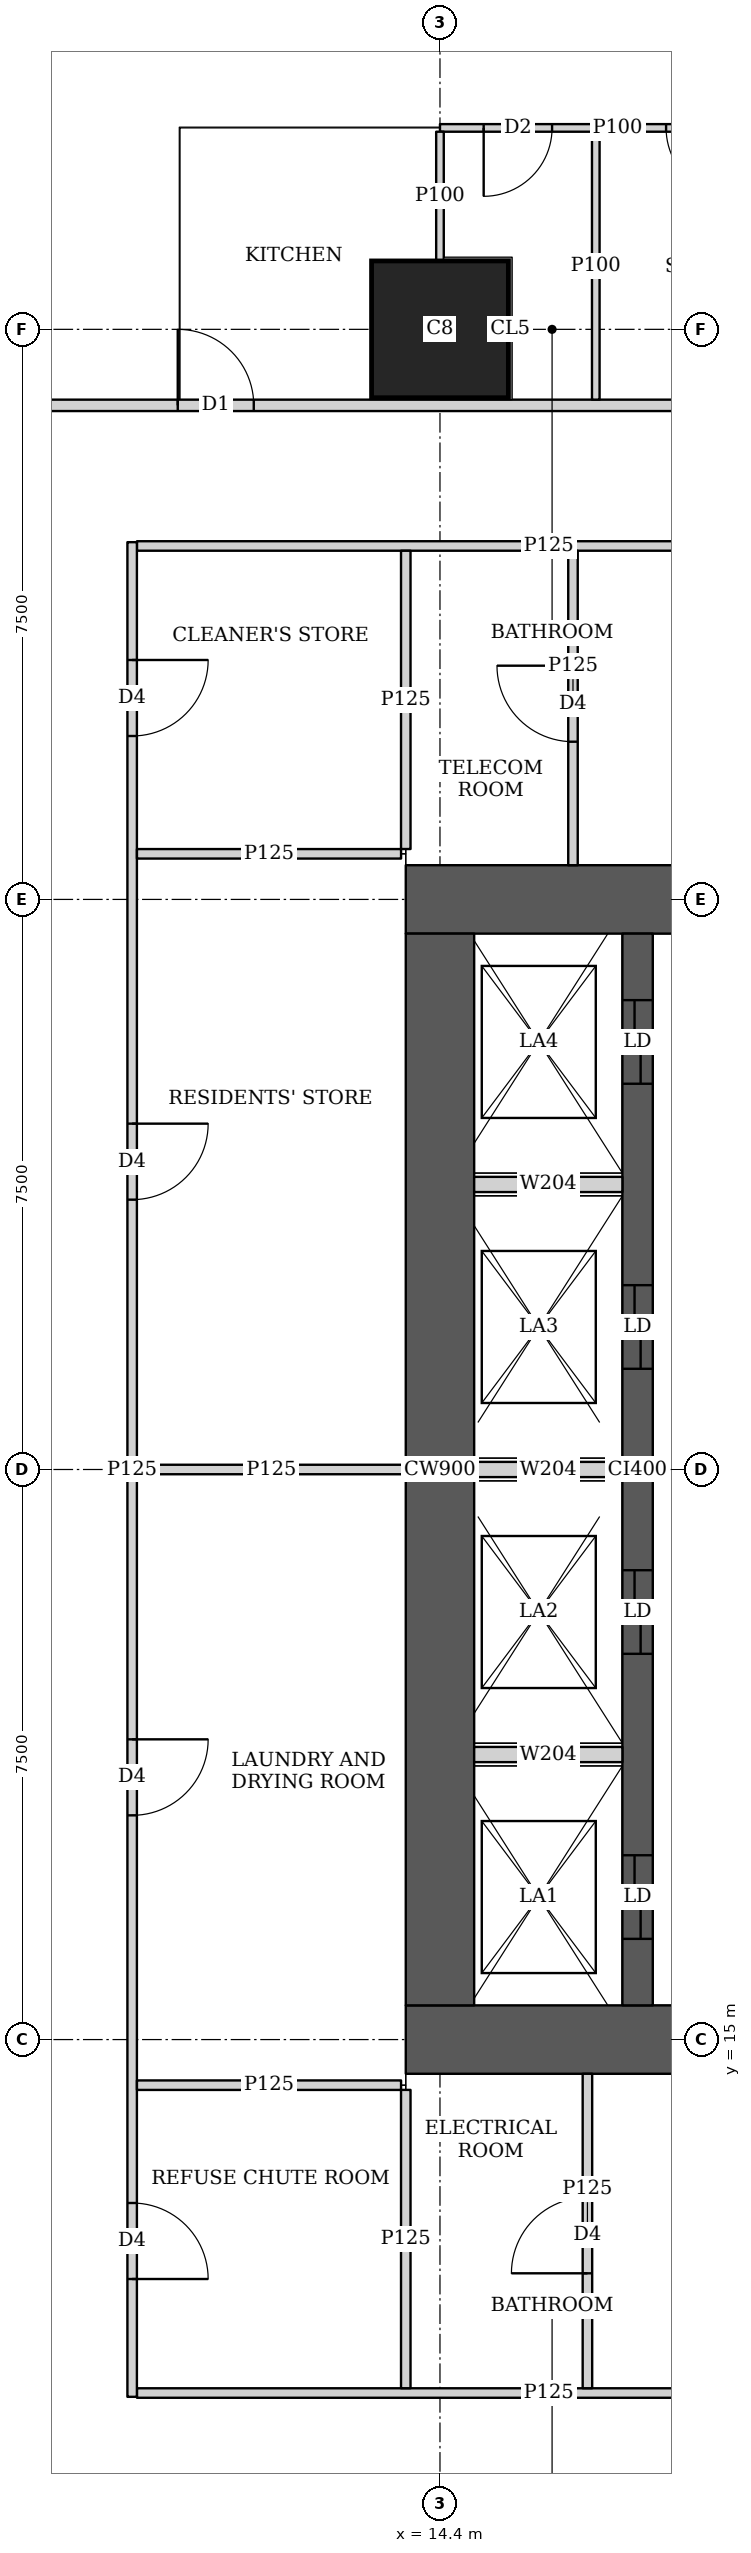
"""IFC4 building model, lengths in metres.
Left out: names, types, materials, properties, quantities, classifications, styles, units other than length and angle.
Written with IfcOpenShell. Run it as: python <this file> out.ifc"""

import sys

from ifc_helpers import new_model, si_unit, direction, frame, frame_2d, origin, origin_2d, place, context, subcontext, project, spatial, rectangle, extrude, element, fill, save


model = new_model("IFC4")
c1 = context("Model", 3, precision=1e-05, world=origin(), true_north=direction((0.0, 1.0)))
c2 = subcontext(c1, "Body", "Model", "MODEL_VIEW")
j1 = project(units=[si_unit("LENGTHUNIT", "METRE"), si_unit("PLANEANGLEUNIT", "RADIAN")], contexts=[c1])
p1 = place(None, origin())
s1 = spatial("IfcSite", under=j1, at=p1, CompositionType="ELEMENT")
p2 = place(p1, origin())
s2 = spatial("IfcBuilding", under=s1, at=p2, CompositionType="ELEMENT")
p3 = place(p2, frame((0.0, 0.0, 68.75)))
s3 = spatial("IfcBuildingStorey", under=s2, at=p3, CompositionType="ELEMENT", Elevation=68.75)
p4 = place(p3, frame((14.4, 37.5, 0.0), z_axis=(0.0, 0.0, 1.0), x_axis=(1.0, 0.0, 0.0)))
e1 = element("IfcColumn", 1, at=p4, inside=s3, PredefinedType="COLUMN", context=c2, shape_type="SweptSolid", body=[
    extrude(rectangle(XDim=1.8, YDim=1.8, at=origin_2d()), origin(), (0.0, 0.0, 1.0), 3.75),
])
p5 = place(p3, frame((13.95, 15.0, 0.0), z_axis=(0.0, 0.0, 1.0), x_axis=(1.0, 0.0, 0.0)))
e2 = element("IfcWall", 2, at=p5, inside=s3, PredefinedType="SHEAR", context=c2, shape_type="SweptSolid", body=[
    extrude(rectangle(XDim=15.3, YDim=0.9, at=frame_2d((7.65, 0.0))), origin(), (0.0, 0.0, 1.0), 3.75),
])
p6 = place(p5, frame((4.45, 0.0, 0.0)))
e3 = element("IfcOpeningElement", 3, at=p6, cuts=e2, PredefinedType="OPENING", context=c2, shape_type="SweptSolid", body=[
    extrude(rectangle(XDim=1.8, YDim=2.1, at=frame_2d((0.9, 1.05))), frame((0.0, 0.46, 0.0), z_axis=(0.0, -1.0, 0.0), x_axis=(1.0, 0.0, 0.0)), (0.0, 0.0, 1.0), 0.92),
])
p7 = place(p5, frame((10.7, 0.0, 0.0)))
e4 = element("IfcOpeningElement", 4, at=p7, cuts=e2, PredefinedType="OPENING", context=c2, shape_type="SweptSolid", body=[
    extrude(rectangle(XDim=1.1, YDim=2.1, at=frame_2d((0.55, 1.05))), frame((0.0, 0.46, 0.0), z_axis=(0.0, -1.0, 0.0), x_axis=(1.0, 0.0, 0.0)), (0.0, 0.0, 1.0), 0.92),
])
p8 = place(p3, frame((13.95, 30.0, 0.0), z_axis=(0.0, 0.0, 1.0), x_axis=(1.0, 0.0, 0.0)))
e5 = element("IfcWall", 5, at=p8, inside=s3, PredefinedType="SHEAR", context=c2, shape_type="SweptSolid", body=[
    extrude(rectangle(XDim=15.3, YDim=0.9, at=frame_2d((7.65, 0.0))), origin(), (0.0, 0.0, 1.0), 3.75),
])
p9 = place(p8, frame((4.45, 0.0, 0.0)))
e6 = element("IfcOpeningElement", 6, at=p9, cuts=e5, PredefinedType="OPENING", context=c2, shape_type="SweptSolid", body=[
    extrude(rectangle(XDim=1.8, YDim=2.1, at=frame_2d((0.9, 1.05))), frame((0.0, 0.46, 0.0), z_axis=(0.0, -1.0, 0.0), x_axis=(1.0, 0.0, 0.0)), (0.0, 0.0, 1.0), 0.92),
])
p10 = place(p8, frame((10.7, 0.0, 0.0)))
e7 = element("IfcOpeningElement", 7, at=p10, cuts=e5, PredefinedType="OPENING", context=c2, shape_type="SweptSolid", body=[
    extrude(rectangle(XDim=1.1, YDim=2.1, at=frame_2d((0.55, 1.05))), frame((0.0, 0.46, 0.0), z_axis=(0.0, -1.0, 0.0), x_axis=(1.0, 0.0, 0.0)), (0.0, 0.0, 1.0), 0.92),
])
p11 = place(p3, frame((14.4, 15.45, 0.0), z_axis=(0.0, 0.0, 1.0), x_axis=(0.0, 1.0, 0.0)))
e8 = element("IfcWall", 8, at=p11, inside=s3, PredefinedType="SHEAR", context=c2, shape_type="SweptSolid", body=[
    extrude(rectangle(XDim=14.1, YDim=0.9, at=frame_2d((7.05, 0.0))), origin(), (0.0, 0.0, 1.0), 3.75),
])
p12 = place(p3, frame((17.0, 15.45, 0.0), z_axis=(0.0, 0.0, 1.0), x_axis=(0.0, 1.0, 0.0)))
e9 = element("IfcWall", 9, at=p12, inside=s3, PredefinedType="SHEAR", context=c2, shape_type="SweptSolid", body=[
    extrude(rectangle(XDim=14.1, YDim=0.4, at=frame_2d((7.05, 0.0))), origin(), (0.0, 0.0, 1.0), 3.75),
])
p13 = place(p12, frame((0.875, 0.0, 0.0)))
e10 = element("IfcOpeningElement", 10, at=p13, cuts=e9, PredefinedType="OPENING", context=c2, shape_type="SweptSolid", body=[
    extrude(rectangle(XDim=1.1, YDim=2.1, at=frame_2d((0.55, 1.05))), frame((0.0, 0.21, 0.0), z_axis=(0.0, -1.0, 0.0), x_axis=(1.0, 0.0, 0.0)), (0.0, 0.0, 1.0), 0.42),
])
p14 = place(p12, frame((4.625, 0.0, 0.0)))
e11 = element("IfcOpeningElement", 11, at=p14, cuts=e9, PredefinedType="OPENING", context=c2, shape_type="SweptSolid", body=[
    extrude(rectangle(XDim=1.1, YDim=2.1, at=frame_2d((0.55, 1.05))), frame((0.0, 0.21, 0.0), z_axis=(0.0, -1.0, 0.0), x_axis=(1.0, 0.0, 0.0)), (0.0, 0.0, 1.0), 0.42),
])
p15 = place(p12, frame((8.375, 0.0, 0.0)))
e12 = element("IfcOpeningElement", 12, at=p15, cuts=e9, PredefinedType="OPENING", context=c2, shape_type="SweptSolid", body=[
    extrude(rectangle(XDim=1.1, YDim=2.1, at=frame_2d((0.55, 1.05))), frame((0.0, 0.21, 0.0), z_axis=(0.0, -1.0, 0.0), x_axis=(1.0, 0.0, 0.0)), (0.0, 0.0, 1.0), 0.42),
])
p16 = place(p12, frame((12.125, 0.0, 0.0)))
e13 = element("IfcOpeningElement", 13, at=p16, cuts=e9, PredefinedType="OPENING", context=c2, shape_type="SweptSolid", body=[
    extrude(rectangle(XDim=1.1, YDim=2.1, at=frame_2d((0.55, 1.05))), frame((0.0, 0.21, 0.0), z_axis=(0.0, -1.0, 0.0), x_axis=(1.0, 0.0, 0.0)), (0.0, 0.0, 1.0), 0.42),
])
p17 = place(p3, frame((8.35, 36.5, 0.0), z_axis=(0.0, 0.0, 1.0), x_axis=(1.0, 0.0, 0.0)))
e14 = element("IfcWall", 14, at=p17, inside=s3, PredefinedType="SOLIDWALL", context=c2, shape_type="SweptSolid", body=[
    extrude(rectangle(XDim=26.415, YDim=0.15, at=frame_2d((13.208, 0.0))), origin(), (0.0, 0.0, 1.0), 3.45),
])
p18 = place(p17, frame((2.6, 0.0, 0.0)))
e15 = element("IfcOpeningElement", 15, at=p18, cuts=e14, PredefinedType="OPENING", context=c2, shape_type="SweptSolid", body=[
    extrude(rectangle(XDim=1.0, YDim=2.1, at=frame_2d((0.5, 1.05))), frame((0.0, 0.085, 0.0), z_axis=(0.0, -1.0, 0.0), x_axis=(1.0, 0.0, 0.0)), (0.0, 0.0, 1.0), 0.17),
])
p19 = place(p17, frame((10.949, 0.0, 0.0)))
e16 = element("IfcOpeningElement", 16, at=p19, cuts=e14, PredefinedType="OPENING", context=c2, shape_type="SweptSolid", body=[
    extrude(rectangle(XDim=1.0, YDim=2.1, at=frame_2d((0.5, 1.05))), frame((0.0, 0.085, 0.0), z_axis=(0.0, -1.0, 0.0), x_axis=(1.0, 0.0, 0.0)), (0.0, 0.0, 1.0), 0.17),
])
p20 = place(p17, frame((18.149, 0.0, 0.0)))
e17 = element("IfcOpeningElement", 17, at=p20, cuts=e14, PredefinedType="OPENING", context=c2, shape_type="SweptSolid", body=[
    extrude(rectangle(XDim=1.0, YDim=2.1, at=frame_2d((0.5, 1.05))), frame((0.0, 0.085, 0.0), z_axis=(0.0, -1.0, 0.0), x_axis=(1.0, 0.0, 0.0)), (0.0, 0.0, 1.0), 0.17),
])
p21 = place(p3, frame((14.4, 40.15, 0.0), z_axis=(0.0, 0.0, 1.0), x_axis=(1.0, 0.0, 0.0)))
e18 = element("IfcWall", 18, at=p21, inside=s3, PredefinedType="PARTITIONING", context=c2, shape_type="SweptSolid", body=[
    extrude(rectangle(XDim=4.674, YDim=0.1, at=frame_2d((2.337, 0.0))), origin(), (0.0, 0.0, 1.0), 3.45),
])
p22 = place(p21, frame((0.575, 0.0, 0.0)))
e19 = element("IfcOpeningElement", 19, at=p22, cuts=e18, PredefinedType="OPENING", context=c2, shape_type="SweptSolid", body=[
    extrude(rectangle(XDim=0.9, YDim=2.1, at=frame_2d((0.45, 1.05))), frame((0.0, 0.06, 0.0), z_axis=(0.0, -1.0, 0.0), x_axis=(1.0, 0.0, 0.0)), (0.0, 0.0, 1.0), 0.12),
])
p23 = place(p21, frame((2.975, 0.0, 0.0)))
e20 = element("IfcOpeningElement", 20, at=p23, cuts=e18, PredefinedType="OPENING", context=c2, shape_type="SweptSolid", body=[
    extrude(rectangle(XDim=0.9, YDim=2.1, at=frame_2d((0.45, 1.05))), frame((0.0, 0.06, 0.0), z_axis=(0.0, -1.0, 0.0), x_axis=(1.0, 0.0, 0.0)), (0.0, 0.0, 1.0), 0.12),
])
p24 = place(p3, frame((14.4, 38.401, 0.0), z_axis=(0.0, 0.0, 1.0), x_axis=(0.0, 1.0, 0.0)))
e21 = element("IfcWall", 21, at=p24, inside=s3, PredefinedType="PARTITIONING", context=c2, shape_type="SweptSolid", body=[
    extrude(rectangle(XDim=1.699, YDim=0.1, at=frame_2d((0.85, 0.0))), origin(), (0.0, 0.0, 1.0), 3.45),
])
p25 = place(p3, frame((16.45, 36.575, 0.0), z_axis=(0.0, 0.0, 1.0), x_axis=(0.0, 1.0, 0.0)))
e22 = element("IfcWall", 22, at=p25, inside=s3, PredefinedType="PARTITIONING", context=c2, shape_type="SweptSolid", body=[
    extrude(rectangle(XDim=3.525, YDim=0.1, at=frame_2d((1.763, 0.0))), origin(), (0.0, 0.0, 1.0), 3.45),
])
p26 = place(p3, frame((10.35, 10.3, 0.0), z_axis=(0.0, 0.0, 1.0), x_axis=(0.0, 1.0, 0.0)))
e23 = element("IfcWall", 23, at=p26, inside=s3, PredefinedType="PARTITIONING", context=c2, shape_type="SweptSolid", body=[
    extrude(rectangle(XDim=24.4, YDim=0.125, at=frame_2d((12.2, 0.0))), origin(), (0.0, 0.0, 1.0), 3.45),
])
p27 = place(p26, frame((1.55, 0.0, 0.0)))
e24 = element("IfcOpeningElement", 24, at=p27, cuts=e23, PredefinedType="OPENING", context=c2, shape_type="SweptSolid", body=[
    extrude(rectangle(XDim=1.0, YDim=2.1, at=frame_2d((0.5, 1.05))), frame((0.0, 0.073, 0.0), z_axis=(0.0, -1.0, 0.0), x_axis=(1.0, 0.0, 0.0)), (0.0, 0.0, 1.0), 0.145),
])
p28 = place(p26, frame((7.65, 0.0, 0.0)))
e25 = element("IfcOpeningElement", 25, at=p28, cuts=e23, PredefinedType="OPENING", context=c2, shape_type="SweptSolid", body=[
    extrude(rectangle(XDim=1.0, YDim=2.1, at=frame_2d((0.5, 1.05))), frame((0.0, 0.073, 0.0), z_axis=(0.0, -1.0, 0.0), x_axis=(1.0, 0.0, 0.0)), (0.0, 0.0, 1.0), 0.145),
])
p29 = place(p26, frame((15.75, 0.0, 0.0)))
e26 = element("IfcOpeningElement", 26, at=p29, cuts=e23, PredefinedType="OPENING", context=c2, shape_type="SweptSolid", body=[
    extrude(rectangle(XDim=1.0, YDim=2.1, at=frame_2d((0.5, 1.05))), frame((0.0, 0.073, 0.0), z_axis=(0.0, -1.0, 0.0), x_axis=(1.0, 0.0, 0.0)), (0.0, 0.0, 1.0), 0.145),
])
p30 = place(p26, frame((21.85, 0.0, 0.0)))
e27 = element("IfcOpeningElement", 27, at=p30, cuts=e23, PredefinedType="OPENING", context=c2, shape_type="SweptSolid", body=[
    extrude(rectangle(XDim=1.0, YDim=2.1, at=frame_2d((0.5, 1.05))), frame((0.0, 0.073, 0.0), z_axis=(0.0, -1.0, 0.0), x_axis=(1.0, 0.0, 0.0)), (0.0, 0.0, 1.0), 0.145),
])
p31 = place(p3, frame((10.413, 14.4, 0.0), z_axis=(0.0, 0.0, 1.0), x_axis=(1.0, 0.0, 0.0)))
e28 = element("IfcWall", 28, at=p31, inside=s3, PredefinedType="PARTITIONING", context=c2, shape_type="SweptSolid", body=[
    extrude(rectangle(XDim=3.475, YDim=0.125, at=frame_2d((1.737, 0.0))), origin(), (0.0, 0.0, 1.0), 3.45),
])
p32 = place(p3, frame((10.413, 22.5, 0.0), z_axis=(0.0, 0.0, 1.0), x_axis=(1.0, 0.0, 0.0)))
e29 = element("IfcWall", 29, at=p32, inside=s3, PredefinedType="PARTITIONING", context=c2, shape_type="SweptSolid", body=[
    extrude(rectangle(XDim=3.537, YDim=0.125, at=frame_2d((1.769, 0.0))), origin(), (0.0, 0.0, 1.0), 3.45),
])
p33 = place(p3, frame((10.413, 30.6, 0.0), z_axis=(0.0, 0.0, 1.0), x_axis=(1.0, 0.0, 0.0)))
e30 = element("IfcWall", 30, at=p33, inside=s3, PredefinedType="PARTITIONING", context=c2, shape_type="SweptSolid", body=[
    extrude(rectangle(XDim=3.475, YDim=0.125, at=frame_2d((1.737, 0.0))), origin(), (0.0, 0.0, 1.0), 3.45),
])
p34 = place(p3, frame((13.95, 10.413, 0.0), z_axis=(0.0, 0.0, 1.0), x_axis=(0.0, 1.0, 0.0)))
e31 = element("IfcWall", 31, at=p34, inside=s3, PredefinedType="PARTITIONING", context=c2, shape_type="SweptSolid", body=[
    extrude(rectangle(XDim=3.925, YDim=0.125, at=frame_2d((1.962, 0.0))), origin(), (0.0, 0.0, 1.0), 3.45),
])
p35 = place(p3, frame((13.95, 30.663, 0.0), z_axis=(0.0, 0.0, 1.0), x_axis=(0.0, 1.0, 0.0)))
e32 = element("IfcWall", 32, at=p35, inside=s3, PredefinedType="PARTITIONING", context=c2, shape_type="SweptSolid", body=[
    extrude(rectangle(XDim=3.924, YDim=0.125, at=frame_2d((1.962, 0.0))), origin(), (0.0, 0.0, 1.0), 3.45),
])
p36 = place(p3, frame((10.413, 10.35, 0.0), z_axis=(0.0, 0.0, 1.0), x_axis=(1.0, 0.0, 0.0)))
e33 = element("IfcWall", 33, at=p36, inside=s3, PredefinedType="PARTITIONING", context=c2, shape_type="SweptSolid", body=[
    extrude(rectangle(XDim=10.837, YDim=0.125, at=frame_2d((5.418, 0.0))), origin(), (0.0, 0.0, 1.0), 3.45),
])
p37 = place(p36, frame((7.582, 0.0, 0.0)))
e34 = element("IfcOpeningElement", 34, at=p37, cuts=e33, PredefinedType="OPENING", context=c2, shape_type="SweptSolid", body=[
    extrude(rectangle(XDim=1.8, YDim=2.1, at=frame_2d((0.9, 1.05))), frame((0.0, 0.073, 0.0), z_axis=(0.0, -1.0, 0.0), x_axis=(1.0, 0.0, 0.0)), (0.0, 0.0, 1.0), 0.145),
])
p38 = place(p3, frame((10.413, 34.65, 0.0), z_axis=(0.0, 0.0, 1.0), x_axis=(1.0, 0.0, 0.0)))
e35 = element("IfcWall", 35, at=p38, inside=s3, PredefinedType="PARTITIONING", context=c2, shape_type="SweptSolid", body=[
    extrude(rectangle(XDim=10.837, YDim=0.125, at=frame_2d((5.418, 0.0))), origin(), (0.0, 0.0, 1.0), 3.45),
])
p39 = place(p38, frame((7.487, 0.0, 0.0)))
e36 = element("IfcOpeningElement", 36, at=p39, cuts=e35, PredefinedType="OPENING", context=c2, shape_type="SweptSolid", body=[
    extrude(rectangle(XDim=1.8, YDim=2.1, at=frame_2d((0.9, 1.05))), frame((0.0, 0.073, 0.0), z_axis=(0.0, -1.0, 0.0), x_axis=(1.0, 0.0, 0.0)), (0.0, 0.0, 1.0), 0.145),
])
p40 = place(p3, frame((16.34, 10.413, 0.0), z_axis=(0.0, 0.0, 1.0), x_axis=(0.0, 1.0, 0.0)))
e37 = element("IfcWall", 37, at=p40, inside=s3, PredefinedType="PARTITIONING", context=c2, shape_type="SweptSolid", body=[
    extrude(rectangle(XDim=4.137, YDim=0.125, at=frame_2d((2.068, 0.0))), origin(), (0.0, 0.0, 1.0), 3.45),
])
p41 = place(p40, frame((1.512, 0.0, 0.0)))
e38 = element("IfcOpeningElement", 38, at=p41, cuts=e37, PredefinedType="OPENING", context=c2, shape_type="SweptSolid", body=[
    extrude(rectangle(XDim=1.0, YDim=2.1, at=frame_2d((0.5, 1.05))), frame((0.0, 0.073, 0.0), z_axis=(0.0, -1.0, 0.0), x_axis=(1.0, 0.0, 0.0)), (0.0, 0.0, 1.0), 0.145),
])
p42 = place(p3, frame((16.15, 30.45, 0.0), z_axis=(0.0, 0.0, 1.0), x_axis=(0.0, 1.0, 0.0)))
e39 = element("IfcWall", 39, at=p42, inside=s3, PredefinedType="PARTITIONING", context=c2, shape_type="SweptSolid", body=[
    extrude(rectangle(XDim=4.137, YDim=0.125, at=frame_2d((2.068, 0.0))), origin(), (0.0, 0.0, 1.0), 3.45),
])
p43 = place(p42, frame((1.625, 0.0, 0.0)))
e40 = element("IfcOpeningElement", 40, at=p43, cuts=e39, PredefinedType="OPENING", context=c2, shape_type="SweptSolid", body=[
    extrude(rectangle(XDim=1.0, YDim=2.1, at=frame_2d((0.5, 1.05))), frame((0.0, 0.073, 0.0), z_axis=(0.0, -1.0, 0.0), x_axis=(1.0, 0.0, 0.0)), (0.0, 0.0, 1.0), 0.145),
])
for number, where, z_axis, x_axis in (
    (41, (14.85, 18.75, 0.0), (0.0, 0.0, 1.0), (1.0, 0.0, 0.0)),
    (42, (14.85, 22.5, 0.0), (0.0, 0.0, 1.0), (1.0, 0.0, 0.0)),
    (43, (14.85, 26.25, 0.0), (0.0, 0.0, 1.0), (1.0, 0.0, 0.0)),
):
    element("IfcWall", number, at=place(p3, frame(where, z_axis=z_axis, x_axis=x_axis)), inside=s3, PredefinedType="SOLIDWALL", context=c2, shape_type="SweptSolid", body=[
        extrude(rectangle(XDim=1.95, YDim=0.2, at=frame_2d((0.975, 0.0))), origin(), (0.0, 0.0, 1.0), 3.45),
    ])
p44 = place(p22, origin())
e44 = element("IfcDoor", 44, at=p44, inside=s3, OperationType="SINGLE_SWING_RIGHT", PredefinedType="DOOR", context=c2, shape_type="SweptSolid", body=[
    extrude(rectangle(XDim=0.9, YDim=2.1, at=frame_2d((0.45, 1.05))), frame((0.0, 0.025, 0.0), z_axis=(0.0, -1.0, 0.0), x_axis=(1.0, 0.0, 0.0)), (0.0, 0.0, 1.0), 0.05),
])
fill(e19, e44)
p45 = place(p23, origin())
e45 = element("IfcDoor", 45, at=p45, inside=s3, OperationType="SINGLE_SWING_LEFT", PredefinedType="DOOR", context=c2, shape_type="SweptSolid", body=[
    extrude(rectangle(XDim=0.9, YDim=2.1, at=frame_2d((0.45, 1.05))), frame((0.0, 0.025, 0.0), z_axis=(0.0, -1.0, 0.0), x_axis=(1.0, 0.0, 0.0)), (0.0, 0.0, 1.0), 0.05),
])
fill(e20, e45)
p46 = place(p18, origin())
e46 = element("IfcDoor", 46, at=p46, inside=s3, OperationType="SINGLE_SWING_LEFT", PredefinedType="DOOR", context=c2, shape_type="SweptSolid", body=[
    extrude(rectangle(XDim=1.0, YDim=2.1, at=frame_2d((0.5, 1.05))), frame((0.0, 0.025, 0.0), z_axis=(0.0, -1.0, 0.0), x_axis=(1.0, 0.0, 0.0)), (0.0, 0.0, 1.0), 0.05),
])
fill(e15, e46)
p47 = place(p27, origin())
e47 = element("IfcDoor", 47, at=p47, inside=s3, OperationType="SINGLE_SWING_RIGHT", PredefinedType="DOOR", context=c2, shape_type="SweptSolid", body=[
    extrude(rectangle(XDim=1.0, YDim=2.1, at=frame_2d((0.5, 1.05))), frame((0.0, 0.025, 0.0), z_axis=(0.0, -1.0, 0.0), x_axis=(1.0, 0.0, 0.0)), (0.0, 0.0, 1.0), 0.05),
])
fill(e24, e47)
p48 = place(p28, origin())
e48 = element("IfcDoor", 48, at=p48, inside=s3, OperationType="SINGLE_SWING_LEFT", PredefinedType="DOOR", context=c2, shape_type="SweptSolid", body=[
    extrude(rectangle(XDim=1.0, YDim=2.1, at=frame_2d((0.5, 1.05))), frame((0.0, 0.025, 0.0), z_axis=(0.0, -1.0, 0.0), x_axis=(1.0, 0.0, 0.0)), (0.0, 0.0, 1.0), 0.05),
])
fill(e25, e48)
p49 = place(p29, origin())
e49 = element("IfcDoor", 49, at=p49, inside=s3, OperationType="SINGLE_SWING_LEFT", PredefinedType="DOOR", context=c2, shape_type="SweptSolid", body=[
    extrude(rectangle(XDim=1.0, YDim=2.1, at=frame_2d((0.5, 1.05))), frame((0.0, 0.025, 0.0), z_axis=(0.0, -1.0, 0.0), x_axis=(1.0, 0.0, 0.0)), (0.0, 0.0, 1.0), 0.05),
])
fill(e26, e49)
p50 = place(p30, origin())
e50 = element("IfcDoor", 50, at=p50, inside=s3, OperationType="SINGLE_SWING_LEFT", PredefinedType="DOOR", context=c2, shape_type="SweptSolid", body=[
    extrude(rectangle(XDim=1.0, YDim=2.1, at=frame_2d((0.5, 1.05))), frame((0.0, 0.025, 0.0), z_axis=(0.0, -1.0, 0.0), x_axis=(1.0, 0.0, 0.0)), (0.0, 0.0, 1.0), 0.05),
])
fill(e27, e50)
p51 = place(p41, origin())
e51 = element("IfcDoor", 51, at=p51, inside=s3, OperationType="SINGLE_SWING_LEFT", PredefinedType="DOOR", context=c2, shape_type="SweptSolid", body=[
    extrude(rectangle(XDim=1.0, YDim=2.1, at=frame_2d((0.5, 1.05))), frame((0.0, 0.025, 0.0), z_axis=(0.0, -1.0, 0.0), x_axis=(1.0, 0.0, 0.0)), (0.0, 0.0, 1.0), 0.05),
])
fill(e38, e51)
p52 = place(p43, origin())
e52 = element("IfcDoor", 52, at=p52, inside=s3, OperationType="SINGLE_SWING_RIGHT", PredefinedType="DOOR", context=c2, shape_type="SweptSolid", body=[
    extrude(rectangle(XDim=1.0, YDim=2.1, at=frame_2d((0.5, 1.05))), frame((0.0, 0.025, 0.0), z_axis=(0.0, -1.0, 0.0), x_axis=(1.0, 0.0, 0.0)), (0.0, 0.0, 1.0), 0.05),
])
fill(e40, e52)
p53 = place(p13, origin())
e53 = element("IfcDoor", 53, at=p53, inside=s3, OperationType="DOUBLE_DOOR_SLIDING", PredefinedType="DOOR", context=c2, shape_type="SweptSolid", body=[
    extrude(rectangle(XDim=1.1, YDim=2.1, at=frame_2d((0.55, 1.05))), frame((0.0, 0.025, 0.0), z_axis=(0.0, -1.0, 0.0), x_axis=(1.0, 0.0, 0.0)), (0.0, 0.0, 1.0), 0.05),
])
fill(e10, e53)
p54 = place(p14, origin())
e54 = element("IfcDoor", 54, at=p54, inside=s3, OperationType="DOUBLE_DOOR_SLIDING", PredefinedType="DOOR", context=c2, shape_type="SweptSolid", body=[
    extrude(rectangle(XDim=1.1, YDim=2.1, at=frame_2d((0.55, 1.05))), frame((0.0, 0.025, 0.0), z_axis=(0.0, -1.0, 0.0), x_axis=(1.0, 0.0, 0.0)), (0.0, 0.0, 1.0), 0.05),
])
fill(e11, e54)
p55 = place(p15, origin())
e55 = element("IfcDoor", 55, at=p55, inside=s3, OperationType="DOUBLE_DOOR_SLIDING", PredefinedType="DOOR", context=c2, shape_type="SweptSolid", body=[
    extrude(rectangle(XDim=1.1, YDim=2.1, at=frame_2d((0.55, 1.05))), frame((0.0, 0.025, 0.0), z_axis=(0.0, -1.0, 0.0), x_axis=(1.0, 0.0, 0.0)), (0.0, 0.0, 1.0), 0.05),
])
fill(e12, e55)
p56 = place(p16, origin())
e56 = element("IfcDoor", 56, at=p56, inside=s3, OperationType="DOUBLE_DOOR_SLIDING", PredefinedType="DOOR", context=c2, shape_type="SweptSolid", body=[
    extrude(rectangle(XDim=1.1, YDim=2.1, at=frame_2d((0.55, 1.05))), frame((0.0, 0.025, 0.0), z_axis=(0.0, -1.0, 0.0), x_axis=(1.0, 0.0, 0.0)), (0.0, 0.0, 1.0), 0.05),
])
fill(e13, e56)
save(model, sys.argv[1])
